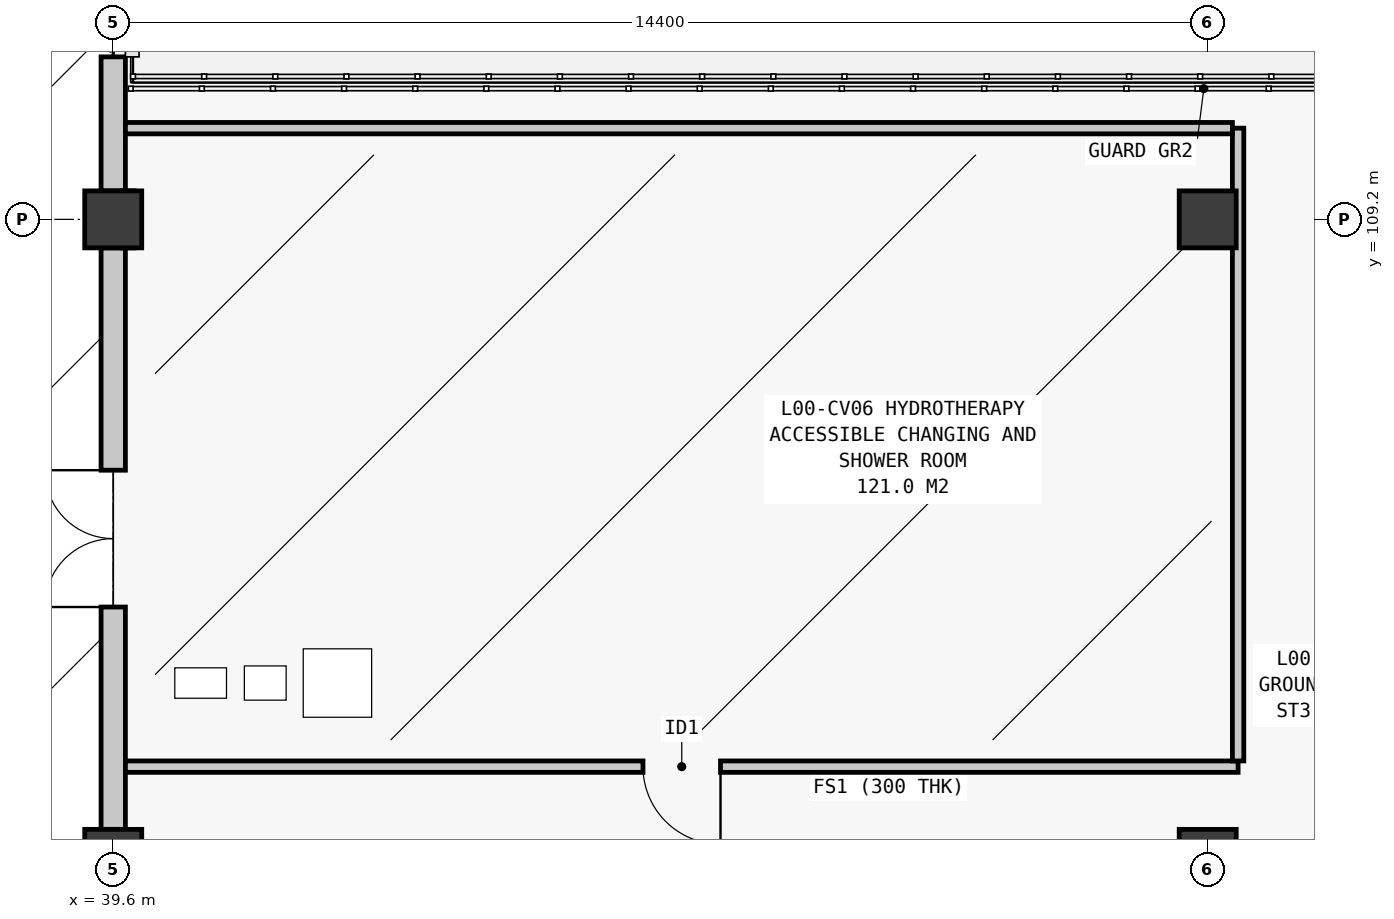
"""IFC4 building model, lengths in metres.
Left out: names, types, materials, properties, quantities, classifications, styles, units other than length and angle.
Written with IfcOpenShell. Run it as: python <this file> out.ifc"""

import sys

from ifc_helpers import new_model, si_unit, direction, frame, frame_2d, origin, origin_2d, place, context, subcontext, project, spatial, rectangle, extrude, element, fill, save


model = new_model("IFC4")
c1 = context("Model", 3, precision=1e-05, world=origin(), true_north=direction((0.0, 1.0)))
c2 = subcontext(c1, "Body", "Model", "MODEL_VIEW")
j1 = project(units=[si_unit("LENGTHUNIT", "METRE"), si_unit("PLANEANGLEUNIT", "RADIAN")], contexts=[c1])
p1 = place(None, origin())
s1 = spatial("IfcSite", under=j1, at=p1, CompositionType="ELEMENT")
p2 = place(p1, origin())
s2 = spatial("IfcBuilding", under=s1, at=p2, CompositionType="ELEMENT")
p3 = place(p2, origin())
s3 = spatial("IfcBuildingStorey", under=s2, at=p3, CompositionType="ELEMENT", Elevation=0.0)
for number, where, z_axis, x_axis in (
    (1, (39.6, 100.8, 0.0), (0.0, 0.0, 1.0), (1.0, 0.0, 0.0)),
    (2, (39.6, 109.2, 0.0), (0.0, 0.0, 1.0), (1.0, 0.0, 0.0)),
    (3, (54.0, 100.8, 0.0), (0.0, 0.0, 1.0), (1.0, 0.0, 0.0)),
    (4, (54.0, 109.2, 0.0), (0.0, 0.0, 1.0), (1.0, 0.0, 0.0)),
):
    element("IfcColumn", number, at=place(p3, frame(where, z_axis=z_axis, x_axis=x_axis)), inside=s3, PredefinedType="COLUMN", context=c2, shape_type="SweptSolid", body=[
        extrude(rectangle(XDim=0.75, YDim=0.75, at=origin_2d()), origin(), (0.0, 0.0, 1.0), 4.8),
    ])
p4 = place(p3, frame((39.6, 108.825, 0.0), z_axis=(0.0, 0.0, 1.0), x_axis=(0.0, -1.0, 0.0)))
e5 = element("IfcWall", 5, at=p4, inside=s3, PredefinedType="STANDARD", context=c2, shape_type="SweptSolid", body=[
    extrude(rectangle(XDim=7.65, YDim=0.32, at=frame_2d((3.825, 0.0))), origin(), (0.0, 0.0, 1.0), 3.976),
])
p5 = place(p4, frame((2.925, 0.0, 0.0)))
e6 = element("IfcOpeningElement", 6, at=p5, cuts=e5, PredefinedType="OPENING", context=c2, shape_type="SweptSolid", body=[
    extrude(rectangle(XDim=1.8, YDim=2.2, at=frame_2d((0.9, 1.1))), frame((0.0, 0.175, 0.0), z_axis=(0.0, -1.0, 0.0), x_axis=(1.0, 0.0, 0.0)), (0.0, 0.0, 1.0), 0.35),
])
p6 = place(p3, frame((39.6, 117.3, 0.0), z_axis=(0.0, 0.0, 1.0), x_axis=(0.0, -1.0, 0.0)))
e7 = element("IfcWall", 7, at=p6, inside=s3, PredefinedType="STANDARD", context=c2, shape_type="SweptSolid", body=[
    extrude(rectangle(XDim=7.725, YDim=0.32, at=frame_2d((3.863, 0.0))), origin(), (0.0, 0.0, 1.0), 3.976),
])
p7 = place(p6, frame((1.762, 0.0, 0.0)))
e8 = element("IfcOpeningElement", 8, at=p7, cuts=e7, PredefinedType="OPENING", context=c2, shape_type="SweptSolid", body=[
    extrude(rectangle(XDim=4.2, YDim=3.2, at=frame_2d((2.1, 1.6))), frame((0.0, 0.175, 0.0), z_axis=(0.0, -1.0, 0.0), x_axis=(1.0, 0.0, 0.0)), (0.0, 0.0, 1.0), 0.35),
])
p8 = place(p3, frame((39.76, 102.0, 0.0), z_axis=(0.0, 0.0, 1.0), x_axis=(1.0, 0.0, 0.0)))
e9 = element("IfcWall", 9, at=p8, inside=s3, PredefinedType="PLUMBINGWALL", context=c2, shape_type="SweptSolid", body=[
    extrude(rectangle(XDim=14.64, YDim=0.15, at=frame_2d((7.32, 0.0))), origin(), (0.0, 0.0, 1.0), 4.52),
])
p9 = place(p8, frame((6.81, 0.0, 0.0)))
e10 = element("IfcOpeningElement", 10, at=p9, cuts=e9, PredefinedType="OPENING", context=c2, shape_type="SweptSolid", body=[
    extrude(rectangle(XDim=1.02, YDim=2.15, at=frame_2d((0.51, 1.075))), frame((0.0, 0.09, 0.0), z_axis=(0.0, -1.0, 0.0), x_axis=(1.0, 0.0, 0.0)), (0.0, 0.0, 1.0), 0.18),
])
p10 = place(p3, frame((54.4, 102.075, 0.0), z_axis=(0.0, 0.0, 1.0), x_axis=(0.0, 1.0, 0.0)))
e11 = element("IfcWall", 11, at=p10, inside=s3, PredefinedType="PLUMBINGWALL", context=c2, shape_type="SweptSolid", body=[
    extrude(rectangle(XDim=8.325, YDim=0.15, at=frame_2d((4.163, 0.0))), origin(), (0.0, 0.0, 1.0), 4.52),
])
p11 = place(p3, frame((39.76, 110.4, 0.0), z_axis=(0.0, 0.0, 1.0), x_axis=(1.0, 0.0, 0.0)))
e12 = element("IfcWall", 12, at=p11, inside=s3, PredefinedType="PLUMBINGWALL", context=c2, shape_type="SweptSolid", body=[
    extrude(rectangle(XDim=14.565, YDim=0.15, at=frame_2d((7.282, 0.0))), origin(), (0.0, 0.0, 1.0), 4.52),
])
p12 = place(p3, frame((39.8, 108.825, 0.0), z_axis=(0.0, 0.0, 1.0), x_axis=(0.0, 1.0, 0.0)))
e13 = element("IfcWall", 13, at=p12, inside=s3, PredefinedType="PLUMBINGWALL", context=c2, shape_type="SweptSolid", body=[
    extrude(rectangle(XDim=0.75, YDim=0.15, at=frame_2d((0.375, 0.0))), origin(), (0.0, 0.0, 1.0), 4.52),
])
p13 = place(p5, frame((1.8, 0.0, 0.0), z_axis=(0.0, 0.0, 1.0), x_axis=(-1.0, 0.0, 0.0)))
e14 = element("IfcDoor", 14, at=p13, inside=s3, OperationType="DOUBLE_DOOR_SINGLE_SWING", PredefinedType="DOOR", context=c2, shape_type="SweptSolid", body=[
    extrude(rectangle(XDim=1.8, YDim=2.2, at=frame_2d((0.9, 1.1))), frame((0.0, 0.025, 0.0), z_axis=(0.0, -1.0, 0.0), x_axis=(1.0, 0.0, 0.0)), (0.0, 0.0, 1.0), 0.05),
])
fill(e6, e14)
p14 = place(p7, frame((4.2, 0.0, 0.0), z_axis=(0.0, 0.0, 1.0), x_axis=(-1.0, 0.0, 0.0)))
e15 = element("IfcDoor", 15, at=p14, inside=s3, OperationType="ROLLINGUP", PredefinedType="GATE", context=c2, shape_type="SweptSolid", body=[
    extrude(rectangle(XDim=4.2, YDim=3.2, at=frame_2d((2.1, 1.6))), frame((0.0, 0.025, 0.0), z_axis=(0.0, -1.0, 0.0), x_axis=(1.0, 0.0, 0.0)), (0.0, 0.0, 1.0), 0.05),
])
fill(e8, e15)
p15 = place(p9, frame((1.02, 0.0, 0.0), z_axis=(0.0, 0.0, 1.0), x_axis=(-1.0, 0.0, 0.0)))
e16 = element("IfcDoor", 16, at=p15, inside=s3, OperationType="SINGLE_SWING_RIGHT", PredefinedType="DOOR", context=c2, shape_type="SweptSolid", body=[
    extrude(rectangle(XDim=1.02, YDim=2.15, at=frame_2d((0.51, 1.075))), frame((0.0, 0.025, 0.0), z_axis=(0.0, -1.0, 0.0), x_axis=(1.0, 0.0, 0.0)), (0.0, 0.0, 1.0), 0.05),
])
fill(e10, e16)
save(model, sys.argv[1])
